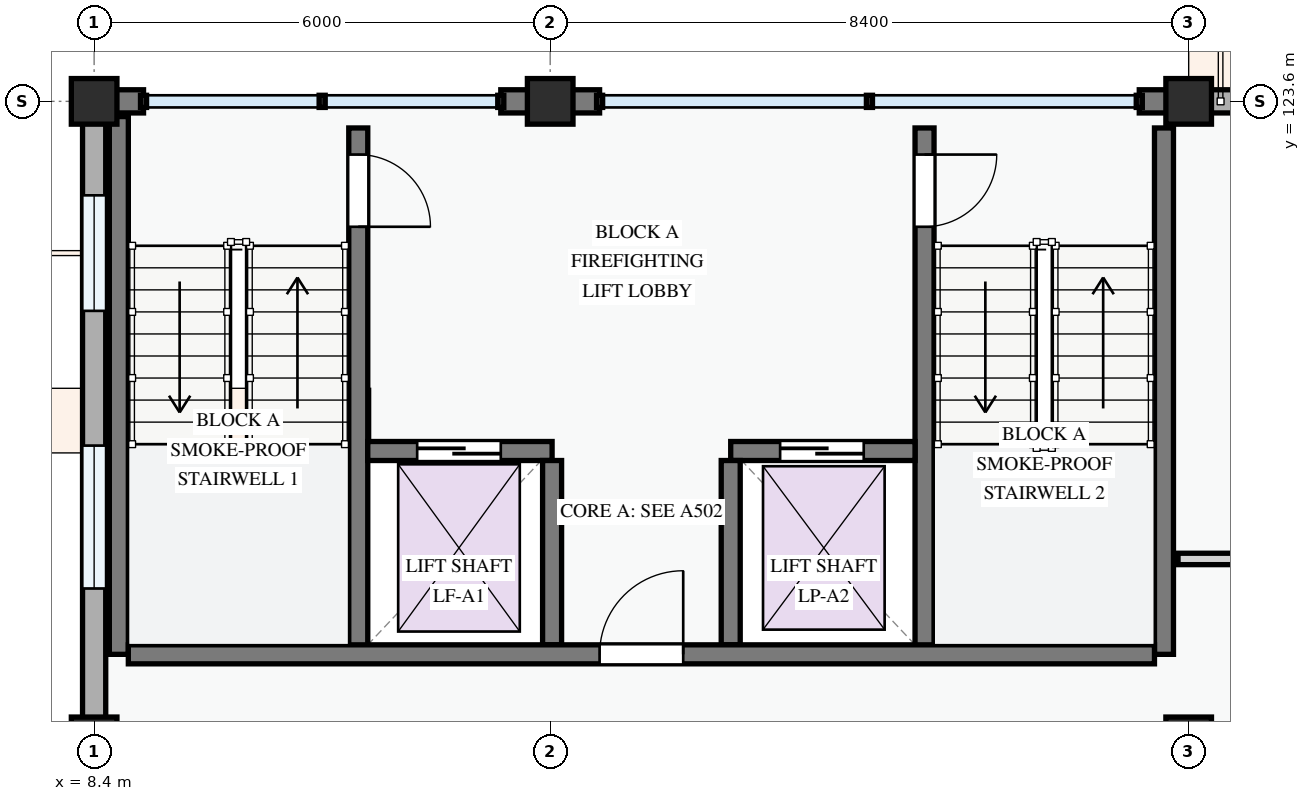
"""IFC4 building model, lengths in metres.
Left out: names, types, materials, properties, quantities, classifications, styles, units other than length and angle.
Written with IfcOpenShell. Run it as: python <this file> out.ifc"""

import sys

from ifc_helpers import new_model, si_unit, direction, frame, frame_2d, origin, origin_2d, place, context, subcontext, project, spatial, rectangle, extrude, element, fill, save


model = new_model("IFC4")
c1 = context("Model", 3, precision=1e-05, world=origin(), true_north=direction((0.0, 1.0)))
c2 = subcontext(c1, "Body", "Model", "MODEL_VIEW")
j1 = project(units=[si_unit("LENGTHUNIT", "METRE"), si_unit("PLANEANGLEUNIT", "RADIAN")], contexts=[c1])
p1 = place(None, origin())
s1 = spatial("IfcSite", under=j1, at=p1, CompositionType="ELEMENT")
p2 = place(p1, origin())
s2 = spatial("IfcBuilding", under=s1, at=p2, CompositionType="ELEMENT")
p3 = place(p2, frame((0.0, 0.0, 24.6)))
s3 = spatial("IfcBuildingStorey", under=s2, at=p3, CompositionType="ELEMENT", Elevation=24.6)
for number, where, z_axis, x_axis in (
    (1, (8.4, 115.2, 0.0), (0.0, 0.0, 1.0), (1.0, 0.0, 0.0)),
    (2, (8.4, 123.6, 0.0), (0.0, 0.0, 1.0), (1.0, 0.0, 0.0)),
    (3, (14.4, 123.6, 0.0), (0.0, 0.0, 1.0), (1.0, 0.0, 0.0)),
    (4, (22.8, 115.2, 0.0), (0.0, 0.0, 1.0), (1.0, 0.0, 0.0)),
    (5, (22.8, 123.6, 0.0), (0.0, 0.0, 1.0), (1.0, 0.0, 0.0)),
):
    element("IfcColumn", number, at=place(p3, frame(where, z_axis=z_axis, x_axis=x_axis)), inside=s3, PredefinedType="COLUMN", context=c2, shape_type="SweptSolid", body=[
        extrude(rectangle(XDim=0.6, YDim=0.6, at=origin_2d()), origin(), (0.0, 0.0, 1.0), 3.3),
    ])
p4 = place(p3, frame((28.8, 123.6, 0.0), z_axis=(0.0, 0.0, 1.0), x_axis=(-1.0, 0.0, 0.0)))
e6 = element("IfcWall", 6, at=p4, inside=s3, PredefinedType="STANDARD", context=c2, shape_type="SweptSolid", body=[
    extrude(rectangle(XDim=6.0, YDim=0.305, at=frame_2d((3.0, 0.0))), origin(), (0.0, 0.0, 1.0), 2.475),
])
p5 = place(p4, frame((0.62, 0.0, 0.0)))
e7 = element("IfcOpeningElement", 7, at=p5, cuts=e6, PredefinedType="OPENING", context=c2, shape_type="SweptSolid", body=[
    extrude(rectangle(XDim=1.05, YDim=2.15, at=frame_2d((0.525, 1.075))), frame((0.0, 0.163, 0.0), z_axis=(0.0, -1.0, 0.0), x_axis=(1.0, 0.0, 0.0)), (0.0, 0.0, 1.0), 0.325),
])
p6 = place(p4, frame((3.065, 0.0, 0.78)))
e8 = element("IfcOpeningElement", 8, at=p6, cuts=e6, PredefinedType="OPENING", context=c2, shape_type="SweptSolid", body=[
    extrude(rectangle(XDim=1.4, YDim=1.45, at=frame_2d((0.7, 0.725))), frame((0.0, 0.163, 0.0), z_axis=(0.0, -1.0, 0.0), x_axis=(1.0, 0.0, 0.0)), (0.0, 0.0, 1.0), 0.325),
])
for number, where, z_axis, x_axis in (
    (9, (22.8, 123.6, 0.0), (0.0, 0.0, 1.0), (-1.0, 0.0, 0.0)),
    (10, (15.05, 123.6, 0.0), (0.0, 0.0, 1.0), (-1.0, 0.0, 0.0)),
):
    element("IfcWall", number, at=place(p3, frame(where, z_axis=z_axis, x_axis=x_axis)), inside=s3, PredefinedType="STANDARD", context=c2, shape_type="SweptSolid", body=[
        extrude(rectangle(XDim=0.65, YDim=0.305, at=frame_2d((0.325, 0.0))), origin(), (0.0, 0.0, 1.0), 3.04),
    ])
p7 = place(p3, frame((14.4, 123.6, 0.0), z_axis=(0.0, 0.0, 1.0), x_axis=(-1.0, 0.0, 0.0)))
e11 = element("IfcWall", 11, at=p7, inside=s3, PredefinedType="STANDARD", context=c2, shape_type="SweptSolid", body=[
    extrude(rectangle(XDim=0.65, YDim=0.305, at=frame_2d((0.325, 0.0))), origin(), (0.0, 0.0, 1.0), 3.04),
])
p8 = place(p3, frame((9.05, 123.6, 0.0), z_axis=(0.0, 0.0, 1.0), x_axis=(-1.0, 0.0, 0.0)))
e12 = element("IfcWall", 12, at=p8, inside=s3, PredefinedType="STANDARD", context=c2, shape_type="SweptSolid", body=[
    extrude(rectangle(XDim=0.496, YDim=0.305, at=frame_2d((0.248, 0.0))), origin(), (0.0, 0.0, 1.0), 3.04),
])
p9 = place(p3, frame((8.4, 123.6, 0.0), z_axis=(0.0, 0.0, 1.0), x_axis=(0.0, -1.0, 0.0)))
e13 = element("IfcWall", 13, at=p9, inside=s3, PredefinedType="STANDARD", context=c2, shape_type="SweptSolid", body=[
    extrude(rectangle(XDim=8.4, YDim=0.305, at=frame_2d((4.2, 0.0))), origin(), (0.0, 0.0, 1.0), 2.425),
])
p10 = place(p9, frame((1.236, 0.0, 0.78)))
e14 = element("IfcOpeningElement", 14, at=p10, cuts=e13, PredefinedType="OPENING", context=c2, shape_type="SweptSolid", body=[
    extrude(rectangle(XDim=1.52, YDim=1.42, at=frame_2d((0.76, 0.71))), frame((0.0, 0.163, 0.0), z_axis=(0.0, -1.0, 0.0), x_axis=(1.0, 0.0, 0.0)), (0.0, 0.0, 1.0), 0.325),
])
p11 = place(p9, frame((4.529, 0.0, 0.78)))
e15 = element("IfcOpeningElement", 15, at=p11, cuts=e13, PredefinedType="OPENING", context=c2, shape_type="SweptSolid", body=[
    extrude(rectangle(XDim=1.88, YDim=1.52, at=frame_2d((0.94, 0.76))), frame((0.0, 0.163, 0.0), z_axis=(0.0, -1.0, 0.0), x_axis=(1.0, 0.0, 0.0)), (0.0, 0.0, 1.0), 0.325),
])
p12 = place(p3, frame((11.875, 123.25, 0.0), z_axis=(0.0, 0.0, 1.0), x_axis=(0.0, -1.0, 0.0)))
e16 = element("IfcWall", 16, at=p12, inside=s3, PredefinedType="SHEAR", context=c2, shape_type="SweptSolid", body=[
    extrude(rectangle(XDim=6.925, YDim=0.25, at=frame_2d((3.462, 0.0))), origin(), (0.0, 0.0, 1.0), 3.0),
])
p13 = place(p12, frame((0.35, 0.0, 0.0)))
e17 = element("IfcOpeningElement", 17, at=p13, cuts=e16, PredefinedType="OPENING", context=c2, shape_type="SweptSolid", body=[
    extrude(rectangle(XDim=0.95, YDim=2.1, at=frame_2d((0.475, 1.05))), frame((0.0, 0.135, 0.0), z_axis=(0.0, -1.0, 0.0), x_axis=(1.0, 0.0, 0.0)), (0.0, 0.0, 1.0), 0.27),
])
p14 = place(p3, frame((8.725, 123.4, 0.0), z_axis=(0.0, 0.0, 1.0), x_axis=(0.0, -1.0, 0.0)))
e18 = element("IfcWall", 18, at=p14, inside=s3, PredefinedType="SHEAR", context=c2, shape_type="SweptSolid", body=[
    extrude(rectangle(XDim=7.075, YDim=0.25, at=frame_2d((3.538, 0.0))), origin(), (0.0, 0.0, 1.0), 3.0),
])
p15 = place(p3, frame((22.475, 123.25, 0.0), z_axis=(0.0, 0.0, 1.0), x_axis=(0.0, -1.0, 0.0)))
e19 = element("IfcWall", 19, at=p15, inside=s3, PredefinedType="SHEAR", context=c2, shape_type="SweptSolid", body=[
    extrude(rectangle(XDim=6.925, YDim=0.25, at=frame_2d((3.462, 0.0))), origin(), (0.0, 0.0, 1.0), 3.0),
])
p16 = place(p3, frame((19.325, 123.25, 0.0), z_axis=(0.0, 0.0, 1.0), x_axis=(0.0, -1.0, 0.0)))
e20 = element("IfcWall", 20, at=p16, inside=s3, PredefinedType="SHEAR", context=c2, shape_type="SweptSolid", body=[
    extrude(rectangle(XDim=6.925, YDim=0.25, at=frame_2d((3.462, 0.0))), origin(), (0.0, 0.0, 1.0), 3.0),
])
p17 = place(p16, frame((0.35, 0.0, 0.0)))
e21 = element("IfcOpeningElement", 21, at=p17, cuts=e20, PredefinedType="OPENING", context=c2, shape_type="SweptSolid", body=[
    extrude(rectangle(XDim=0.95, YDim=2.1, at=frame_2d((0.475, 1.05))), frame((0.0, 0.135, 0.0), z_axis=(0.0, -1.0, 0.0), x_axis=(1.0, 0.0, 0.0)), (0.0, 0.0, 1.0), 0.27),
])
p18 = place(p3, frame((12.0, 119.0, 0.0), z_axis=(0.0, 0.0, 1.0), x_axis=(1.0, 0.0, 0.0)))
e22 = element("IfcWall", 22, at=p18, inside=s3, PredefinedType="SHEAR", context=c2, shape_type="SweptSolid", body=[
    extrude(rectangle(XDim=2.425, YDim=0.25, at=frame_2d((1.212, 0.0))), origin(), (0.0, 0.0, 1.0), 3.0),
])
p19 = place(p18, frame((0.65, 0.0, 0.0)))
e23 = element("IfcOpeningElement", 23, at=p19, cuts=e22, PredefinedType="OPENING", context=c2, shape_type="SweptSolid", body=[
    extrude(rectangle(XDim=1.1, YDim=2.15, at=frame_2d((0.55, 1.075))), frame((0.0, 0.135, 0.0), z_axis=(0.0, -1.0, 0.0), x_axis=(1.0, 0.0, 0.0)), (0.0, 0.0, 1.0), 0.27),
])
p20 = place(p3, frame((16.775, 119.0, 0.0), z_axis=(0.0, 0.0, 1.0), x_axis=(1.0, 0.0, 0.0)))
e24 = element("IfcWall", 24, at=p20, inside=s3, PredefinedType="SHEAR", context=c2, shape_type="SweptSolid", body=[
    extrude(rectangle(XDim=2.425, YDim=0.25, at=frame_2d((1.212, 0.0))), origin(), (0.0, 0.0, 1.0), 3.0),
])
p21 = place(p20, frame((0.65, 0.0, 0.0)))
e25 = element("IfcOpeningElement", 25, at=p21, cuts=e24, PredefinedType="OPENING", context=c2, shape_type="SweptSolid", body=[
    extrude(rectangle(XDim=1.1, YDim=2.15, at=frame_2d((0.55, 1.075))), frame((0.0, 0.135, 0.0), z_axis=(0.0, -1.0, 0.0), x_axis=(1.0, 0.0, 0.0)), (0.0, 0.0, 1.0), 0.27),
])
for number, where, z_axis, x_axis in (
    (26, (14.425, 118.875, 0.0), (0.0, 0.0, 1.0), (0.0, -1.0, 0.0)),
    (27, (16.775, 118.875, 0.0), (0.0, 0.0, 1.0), (0.0, -1.0, 0.0)),
):
    element("IfcWall", number, at=place(p3, frame(where, z_axis=z_axis, x_axis=x_axis)), inside=s3, PredefinedType="SHEAR", context=c2, shape_type="SweptSolid", body=[
        extrude(rectangle(XDim=2.425, YDim=0.25, at=frame_2d((1.212, 0.0))), origin(), (0.0, 0.0, 1.0), 3.0),
    ])
p22 = place(p3, frame((8.85, 116.325, 0.0), z_axis=(0.0, 0.0, 1.0), x_axis=(1.0, 0.0, 0.0)))
e28 = element("IfcWall", 28, at=p22, inside=s3, PredefinedType="SHEAR", context=c2, shape_type="SweptSolid", body=[
    extrude(rectangle(XDim=13.5, YDim=0.25, at=frame_2d((6.75, 0.0))), origin(), (0.0, 0.0, 1.0), 3.0),
])
p23 = place(p22, frame((6.2, 0.0, 0.0)))
e29 = element("IfcOpeningElement", 29, at=p23, cuts=e28, PredefinedType="OPENING", context=c2, shape_type="SweptSolid", body=[
    extrude(rectangle(XDim=1.1, YDim=2.15, at=frame_2d((0.55, 1.075))), frame((0.0, 0.135, 0.0), z_axis=(0.0, -1.0, 0.0), x_axis=(1.0, 0.0, 0.0)), (0.0, 0.0, 1.0), 0.27),
])
p24 = place(p3, frame((22.66, 117.58, 0.0), z_axis=(0.0, 0.0, 1.0), x_axis=(1.0, 0.0, 0.0)))
e30 = element("IfcWall", 30, at=p24, inside=s3, PredefinedType="PARTITIONING", context=c2, shape_type="SweptSolid", body=[
    extrude(rectangle(XDim=28.88, YDim=0.15, at=frame_2d((14.44, 0.0))), origin(), (0.0, 0.0, 1.0), 3.0),
])
p25 = place(p24, frame((2.74, 0.0, 0.0)))
e31 = element("IfcOpeningElement", 31, at=p25, cuts=e30, PredefinedType="OPENING", context=c2, shape_type="SweptSolid", body=[
    extrude(rectangle(XDim=0.92, YDim=2.1, at=frame_2d((0.46, 1.05))), frame((0.0, 0.085, 0.0), z_axis=(0.0, -1.0, 0.0), x_axis=(1.0, 0.0, 0.0)), (0.0, 0.0, 1.0), 0.17),
])
p26 = place(p24, frame((10.13, 0.0, 0.0)))
e32 = element("IfcOpeningElement", 32, at=p26, cuts=e30, PredefinedType="OPENING", context=c2, shape_type="SweptSolid", body=[
    extrude(rectangle(XDim=0.92, YDim=2.1, at=frame_2d((0.46, 1.05))), frame((0.0, 0.085, 0.0), z_axis=(0.0, -1.0, 0.0), x_axis=(1.0, 0.0, 0.0)), (0.0, 0.0, 1.0), 0.17),
])
p27 = place(p24, frame((17.52, 0.0, 0.0)))
e33 = element("IfcOpeningElement", 33, at=p27, cuts=e30, PredefinedType="OPENING", context=c2, shape_type="SweptSolid", body=[
    extrude(rectangle(XDim=0.92, YDim=2.1, at=frame_2d((0.46, 1.05))), frame((0.0, 0.085, 0.0), z_axis=(0.0, -1.0, 0.0), x_axis=(1.0, 0.0, 0.0)), (0.0, 0.0, 1.0), 0.17),
])
p28 = place(p10, origin())
e34 = element("IfcWindow", 34, at=p28, inside=s3, PartitioningType="SINGLE_PANEL", PredefinedType="WINDOW", context=c2, shape_type="SweptSolid", body=[
    extrude(rectangle(XDim=1.52, YDim=1.42, at=frame_2d((0.76, 0.71))), frame((0.0, 0.03, 0.0), z_axis=(0.0, -1.0, 0.0), x_axis=(1.0, 0.0, 0.0)), (0.0, 0.0, 1.0), 0.06),
])
fill(e14, e34)
p29 = place(p11, origin())
e35 = element("IfcWindow", 35, at=p29, inside=s3, PartitioningType="DOUBLE_PANEL_VERTICAL", PredefinedType="WINDOW", context=c2, shape_type="SweptSolid", body=[
    extrude(rectangle(XDim=1.88, YDim=1.52, at=frame_2d((0.94, 0.76))), frame((0.0, 0.03, 0.0), z_axis=(0.0, -1.0, 0.0), x_axis=(1.0, 0.0, 0.0)), (0.0, 0.0, 1.0), 0.06),
])
fill(e15, e35)
p30 = place(p13, origin())
e36 = element("IfcDoor", 36, at=p30, inside=s3, OperationType="SINGLE_SWING_RIGHT", PredefinedType="DOOR", context=c2, shape_type="SweptSolid", body=[
    extrude(rectangle(XDim=0.95, YDim=2.1, at=frame_2d((0.475, 1.05))), frame((0.0, 0.025, 0.0), z_axis=(0.0, -1.0, 0.0), x_axis=(1.0, 0.0, 0.0)), (0.0, 0.0, 1.0), 0.05),
])
fill(e17, e36)
p31 = place(p17, origin())
e37 = element("IfcDoor", 37, at=p31, inside=s3, OperationType="SINGLE_SWING_LEFT", PredefinedType="DOOR", context=c2, shape_type="SweptSolid", body=[
    extrude(rectangle(XDim=0.95, YDim=2.1, at=frame_2d((0.475, 1.05))), frame((0.0, 0.025, 0.0), z_axis=(0.0, -1.0, 0.0), x_axis=(1.0, 0.0, 0.0)), (0.0, 0.0, 1.0), 0.05),
])
fill(e21, e37)
p32 = place(p19, origin())
e38 = element("IfcDoor", 38, at=p32, inside=s3, OperationType="SLIDING_TO_LEFT", PredefinedType="DOOR", context=c2, shape_type="SweptSolid", body=[
    extrude(rectangle(XDim=1.1, YDim=2.15, at=frame_2d((0.55, 1.075))), frame((0.0, 0.025, 0.0), z_axis=(0.0, -1.0, 0.0), x_axis=(1.0, 0.0, 0.0)), (0.0, 0.0, 1.0), 0.05),
])
fill(e23, e38)
p33 = place(p21, origin())
e39 = element("IfcDoor", 39, at=p33, inside=s3, OperationType="SLIDING_TO_LEFT", PredefinedType="DOOR", context=c2, shape_type="SweptSolid", body=[
    extrude(rectangle(XDim=1.1, YDim=2.15, at=frame_2d((0.55, 1.075))), frame((0.0, 0.025, 0.0), z_axis=(0.0, -1.0, 0.0), x_axis=(1.0, 0.0, 0.0)), (0.0, 0.0, 1.0), 0.05),
])
fill(e25, e39)
p34 = place(p23, origin())
e40 = element("IfcDoor", 40, at=p34, inside=s3, OperationType="SINGLE_SWING_RIGHT", PredefinedType="DOOR", context=c2, shape_type="SweptSolid", body=[
    extrude(rectangle(XDim=1.1, YDim=2.15, at=frame_2d((0.55, 1.075))), frame((0.0, 0.025, 0.0), z_axis=(0.0, -1.0, 0.0), x_axis=(1.0, 0.0, 0.0)), (0.0, 0.0, 1.0), 0.05),
])
fill(e29, e40)
save(model, sys.argv[1])
